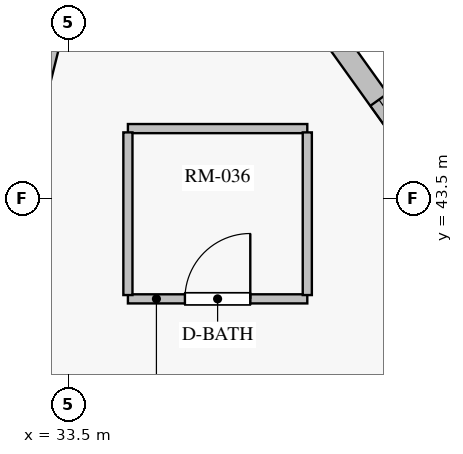
"""IFC4 building model, lengths in metres.
Left out: names, types, materials, properties, quantities, classifications, styles, units other than length and angle.
Written with IfcOpenShell. Run it as: python <this file> out.ifc"""

import sys

from ifc_helpers import new_model, si_unit, direction, frame, frame_2d, origin, origin_with_axes, place, context, subcontext, project, spatial, rectangle, extrude, source, transform, mapped, element, fill, save


model = new_model("IFC4")
c1 = context("Model", 3, precision=1e-05, world=origin(), true_north=direction((0.0, 1.0)))
c2 = subcontext(c1, "Body", "Model", "MODEL_VIEW")
j1 = project(units=[si_unit("LENGTHUNIT", "METRE"), si_unit("PLANEANGLEUNIT", "RADIAN")], contexts=[c1])
p1 = place(None, origin())
s1 = spatial("IfcSite", under=j1, at=p1, CompositionType="ELEMENT")
p2 = place(p1, origin())
s2 = spatial("IfcBuilding", under=s1, at=p2, CompositionType="ELEMENT")
p3 = place(p2, frame((0.0, 0.0, 238.25)))
s3 = spatial("IfcBuildingStorey", under=s2, at=p3, CompositionType="ELEMENT", Elevation=238.25)
p4 = place(p3, frame((43.586, 36.421, 0.0), z_axis=(0.0, 0.0, 1.0), x_axis=(-0.582142908701, 0.813086486082, 0.0)))
e1 = element("IfcWall", 1, at=p4, inside=s3, PredefinedType="SOLIDWALL", context=c2, shape_type="SweptSolid", body=[
    extrude(rectangle(XDim=11.712, YDim=0.28, at=frame_2d((5.856, 0.0))), origin(), (0.0, 0.0, 1.0), 2.85),
])
p5 = place(p4, frame((1.406, 0.0, 0.85)))
e2 = element("IfcOpeningElement", 2, at=p5, cuts=e1, PredefinedType="OPENING", context=c2, shape_type="SweptSolid", body=[
    extrude(rectangle(XDim=1.6, YDim=1.6, at=frame_2d((0.8, 0.8))), frame((0.0, 0.15, 0.0), z_axis=(0.0, -1.0, 0.0), x_axis=(1.0, 0.0, 0.0)), (0.0, 0.0, 1.0), 0.3),
])
p6 = place(p4, frame((5.056, 0.0, 0.85)))
e3 = element("IfcOpeningElement", 3, at=p6, cuts=e1, PredefinedType="OPENING", context=c2, shape_type="SweptSolid", body=[
    extrude(rectangle(XDim=1.6, YDim=1.6, at=frame_2d((0.8, 0.8))), frame((0.0, 0.15, 0.0), z_axis=(0.0, -1.0, 0.0), x_axis=(1.0, 0.0, 0.0)), (0.0, 0.0, 1.0), 0.3),
])
p7 = place(p4, frame((8.707, 0.0, 0.85)))
e4 = element("IfcOpeningElement", 4, at=p7, cuts=e1, PredefinedType="OPENING", context=c2, shape_type="SweptSolid", body=[
    extrude(rectangle(XDim=1.6, YDim=1.6, at=frame_2d((0.8, 0.8))), frame((0.0, 0.15, 0.0), z_axis=(0.0, -1.0, 0.0), x_axis=(1.0, 0.0, 0.0)), (0.0, 0.0, 1.0), 0.3),
])
p8 = place(p3, frame((31.023, 36.371, 0.0), z_axis=(0.0, 0.0, 1.0), x_axis=(0.241913852828, 0.970297731529, 0.0)))
e5 = element("IfcWall", 5, at=p8, inside=s3, PredefinedType="PARTITIONING", context=c2, shape_type="SweptSolid", body=[
    extrude(rectangle(XDim=10.348, YDim=0.16, at=frame_2d((5.174, 0.0))), origin(), (0.0, 0.0, 1.0), 2.85),
])
p9 = place(p3, frame((34.283, 42.181, 0.0), z_axis=(0.0, 0.0, 1.0), x_axis=(1.0, 0.0, 0.0)))
e6 = element("IfcWall", 6, at=p9, inside=s3, PredefinedType="PARTITIONING", context=c2, shape_type="SweptSolid", body=[
    extrude(rectangle(XDim=2.36, YDim=0.12, at=frame_2d((1.18, 0.0))), origin(), (0.0, 0.0, 1.0), 2.85),
])
p10 = place(p9, frame((0.75, 0.0, 0.0)))
e7 = element("IfcOpeningElement", 7, at=p10, cuts=e6, PredefinedType="OPENING", context=c2, shape_type="SweptSolid", body=[
    extrude(rectangle(XDim=0.86, YDim=2.1, at=frame_2d((0.43, 1.05))), frame((0.0, 0.07, 0.0), z_axis=(0.0, -1.0, 0.0), x_axis=(1.0, 0.0, 0.0)), (0.0, 0.0, 1.0), 0.14),
])
p11 = place(p3, frame((36.643, 44.421, 0.0), z_axis=(0.0, 0.0, 1.0), x_axis=(-1.0, 0.0, 0.0)))
e8 = element("IfcWall", 8, at=p11, inside=s3, PredefinedType="PARTITIONING", context=c2, shape_type="SweptSolid", body=[
    extrude(rectangle(XDim=2.36, YDim=0.12, at=frame_2d((1.18, 0.0))), origin(), (0.0, 0.0, 1.0), 2.85),
])
for number, where, z_axis, x_axis in (
    (9, (36.643, 42.231, 0.0), (0.0, 0.0, 1.0), (0.0, 1.0, 0.0)),
    (10, (34.283, 44.371, 0.0), (0.0, 0.0, 1.0), (0.0, -1.0, 0.0)),
):
    element("IfcWall", number, at=place(p3, frame(where, z_axis=z_axis, x_axis=x_axis)), inside=s3, PredefinedType="PARTITIONING", context=c2, shape_type="SweptSolid", body=[
        extrude(rectangle(XDim=2.14, YDim=0.12, at=frame_2d((1.07, 0.0))), origin(), (0.0, 0.0, 1.0), 2.85),
    ])
m1 = source(origin_with_axes(), c2, "Body", "SweptSolid", [
    extrude(rectangle(XDim=1.6, YDim=1.6, at=frame_2d((0.8, 0.8))), frame((0.0, 0.03, 0.0), z_axis=(0.0, -1.0, 0.0), x_axis=(1.0, 0.0, 0.0)), (0.0, 0.0, 1.0), 0.06),
])
p12 = place(p7, origin())
e11 = element("IfcWindow", 11, at=p12, inside=s3, PartitioningType="SINGLE_PANEL", PredefinedType="WINDOW", context=c2, shape_type="MappedRepresentation", body=[
    mapped(m1, transform((0.0, 0.0, 0.0), scale=1.0)),
])
fill(e4, e11)
m2 = source(origin_with_axes(), c2, "Body", "SweptSolid", [
    extrude(rectangle(XDim=0.86, YDim=2.1, at=frame_2d((0.43, 1.05))), frame((0.0, 0.025, 0.0), z_axis=(0.0, -1.0, 0.0), x_axis=(1.0, 0.0, 0.0)), (0.0, 0.0, 1.0), 0.05),
])
p13 = place(p10, origin())
e12 = element("IfcDoor", 12, at=p13, inside=s3, OperationType="SINGLE_SWING_RIGHT", PredefinedType="DOOR", context=c2, shape_type="MappedRepresentation", body=[
    mapped(m2, transform((0.0, 0.0, 0.0), scale=1.0)),
])
fill(e7, e12)
save(model, sys.argv[1])
